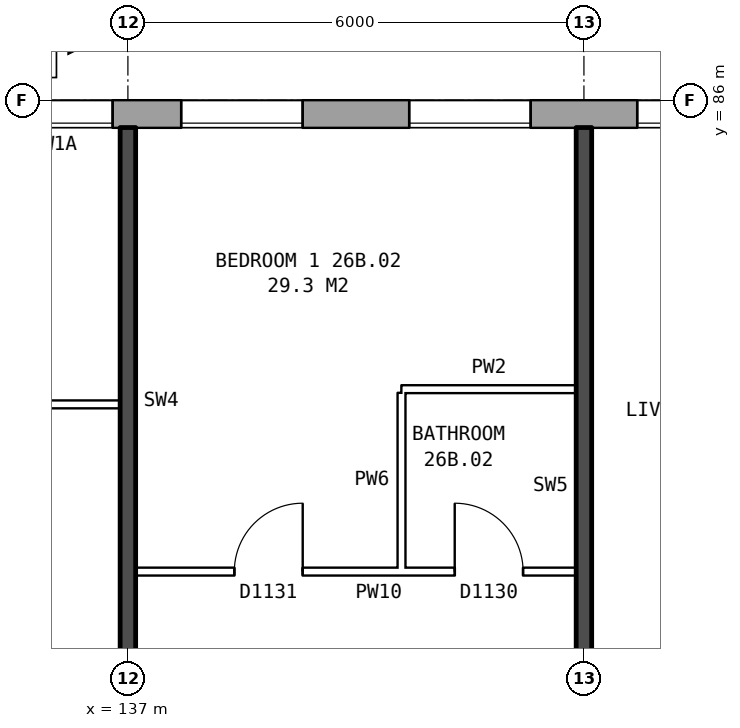
"""IFC4 building model, lengths in metres.
Left out: names, types, materials, properties, quantities, classifications, styles, units other than length and angle.
Written with IfcOpenShell. Run it as: python <this file> out.ifc"""

import sys

from ifc_helpers import new_model, si_unit, direction, frame, frame_2d, origin, place, context, subcontext, project, spatial, rectangle, extrude, element, fill, save


model = new_model("IFC4")
c1 = context("Model", 3, precision=1e-05, world=origin(), true_north=direction((0.0, 1.0)))
c2 = subcontext(c1, "Body", "Model", "MODEL_VIEW")
j1 = project(units=[si_unit("LENGTHUNIT", "METRE"), si_unit("PLANEANGLEUNIT", "RADIAN")], contexts=[c1])
p1 = place(None, origin())
s1 = spatial("IfcSite", under=j1, at=p1, CompositionType="ELEMENT")
p2 = place(p1, origin())
s2 = spatial("IfcBuilding", under=s1, at=p2, CompositionType="ELEMENT")
p3 = place(p2, frame((0.0, 0.0, 96.4)))
s3 = spatial("IfcBuildingStorey", under=s2, at=p3, CompositionType="ELEMENT", Elevation=96.4)
p4 = place(p3, frame((170.925, 85.82, 0.0), z_axis=(0.0, 0.0, 1.0), x_axis=(-1.0, 0.0, 0.0)))
e1 = element("IfcWall", 1, at=p4, inside=s3, PredefinedType="STANDARD", context=c2, shape_type="SweptSolid", body=[
    extrude(rectangle(XDim=36.851, YDim=0.36, at=frame_2d((18.425, 0.0))), origin(), (0.0, 0.0, 1.0), 2.85),
])
p5 = place(p4, frame((1.625, 0.0, 0.8)))
e2 = element("IfcOpeningElement", 2, at=p5, cuts=e1, PredefinedType="OPENING", context=c2, shape_type="SweptSolid", body=[
    extrude(rectangle(XDim=1.6, YDim=1.8, at=frame_2d((0.8, 0.9))), frame((0.0, 0.19, 0.0), z_axis=(0.0, -1.0, 0.0), x_axis=(1.0, 0.0, 0.0)), (0.0, 0.0, 1.0), 0.38),
])
p6 = place(p4, frame((4.625, 0.0, 0.8)))
e3 = element("IfcOpeningElement", 3, at=p6, cuts=e1, PredefinedType="OPENING", context=c2, shape_type="SweptSolid", body=[
    extrude(rectangle(XDim=1.6, YDim=1.8, at=frame_2d((0.8, 0.9))), frame((0.0, 0.19, 0.0), z_axis=(0.0, -1.0, 0.0), x_axis=(1.0, 0.0, 0.0)), (0.0, 0.0, 1.0), 0.38),
])
p7 = place(p4, frame((7.625, 0.0, 0.8)))
e4 = element("IfcOpeningElement", 4, at=p7, cuts=e1, PredefinedType="OPENING", context=c2, shape_type="SweptSolid", body=[
    extrude(rectangle(XDim=1.6, YDim=1.8, at=frame_2d((0.8, 0.9))), frame((0.0, 0.19, 0.0), z_axis=(0.0, -1.0, 0.0), x_axis=(1.0, 0.0, 0.0)), (0.0, 0.0, 1.0), 0.38),
])
p8 = place(p4, frame((10.625, 0.0, 0.8)))
e5 = element("IfcOpeningElement", 5, at=p8, cuts=e1, PredefinedType="OPENING", context=c2, shape_type="SweptSolid", body=[
    extrude(rectangle(XDim=1.6, YDim=1.8, at=frame_2d((0.8, 0.9))), frame((0.0, 0.19, 0.0), z_axis=(0.0, -1.0, 0.0), x_axis=(1.0, 0.0, 0.0)), (0.0, 0.0, 1.0), 0.38),
])
p9 = place(p4, frame((13.625, 0.0, 0.8)))
e6 = element("IfcOpeningElement", 6, at=p9, cuts=e1, PredefinedType="OPENING", context=c2, shape_type="SweptSolid", body=[
    extrude(rectangle(XDim=1.6, YDim=1.8, at=frame_2d((0.8, 0.9))), frame((0.0, 0.19, 0.0), z_axis=(0.0, -1.0, 0.0), x_axis=(1.0, 0.0, 0.0)), (0.0, 0.0, 1.0), 0.38),
])
p10 = place(p4, frame((16.625, 0.0, 0.8)))
e7 = element("IfcOpeningElement", 7, at=p10, cuts=e1, PredefinedType="OPENING", context=c2, shape_type="SweptSolid", body=[
    extrude(rectangle(XDim=1.6, YDim=1.8, at=frame_2d((0.8, 0.9))), frame((0.0, 0.19, 0.0), z_axis=(0.0, -1.0, 0.0), x_axis=(1.0, 0.0, 0.0)), (0.0, 0.0, 1.0), 0.38),
])
p11 = place(p4, frame((19.625, 0.0, 0.8)))
e8 = element("IfcOpeningElement", 8, at=p11, cuts=e1, PredefinedType="OPENING", context=c2, shape_type="SweptSolid", body=[
    extrude(rectangle(XDim=1.6, YDim=1.8, at=frame_2d((0.8, 0.9))), frame((0.0, 0.19, 0.0), z_axis=(0.0, -1.0, 0.0), x_axis=(1.0, 0.0, 0.0)), (0.0, 0.0, 1.0), 0.38),
])
p12 = place(p4, frame((22.625, 0.0, 0.8)))
e9 = element("IfcOpeningElement", 9, at=p12, cuts=e1, PredefinedType="OPENING", context=c2, shape_type="SweptSolid", body=[
    extrude(rectangle(XDim=1.6, YDim=1.8, at=frame_2d((0.8, 0.9))), frame((0.0, 0.19, 0.0), z_axis=(0.0, -1.0, 0.0), x_axis=(1.0, 0.0, 0.0)), (0.0, 0.0, 1.0), 0.38),
])
p13 = place(p4, frame((25.625, 0.0, 0.8)))
e10 = element("IfcOpeningElement", 10, at=p13, cuts=e1, PredefinedType="OPENING", context=c2, shape_type="SweptSolid", body=[
    extrude(rectangle(XDim=1.6, YDim=1.8, at=frame_2d((0.8, 0.9))), frame((0.0, 0.19, 0.0), z_axis=(0.0, -1.0, 0.0), x_axis=(1.0, 0.0, 0.0)), (0.0, 0.0, 1.0), 0.38),
])
p14 = place(p4, frame((28.625, 0.0, 0.8)))
e11 = element("IfcOpeningElement", 11, at=p14, cuts=e1, PredefinedType="OPENING", context=c2, shape_type="SweptSolid", body=[
    extrude(rectangle(XDim=1.6, YDim=1.8, at=frame_2d((0.8, 0.9))), frame((0.0, 0.19, 0.0), z_axis=(0.0, -1.0, 0.0), x_axis=(1.0, 0.0, 0.0)), (0.0, 0.0, 1.0), 0.38),
])
p15 = place(p4, frame((31.625, 0.0, 0.8)))
e12 = element("IfcOpeningElement", 12, at=p15, cuts=e1, PredefinedType="OPENING", context=c2, shape_type="SweptSolid", body=[
    extrude(rectangle(XDim=1.6, YDim=1.8, at=frame_2d((0.8, 0.9))), frame((0.0, 0.19, 0.0), z_axis=(0.0, -1.0, 0.0), x_axis=(1.0, 0.0, 0.0)), (0.0, 0.0, 1.0), 0.38),
])
p16 = place(p4, frame((34.125, 0.0, 0.8)))
e13 = element("IfcOpeningElement", 13, at=p16, cuts=e1, PredefinedType="OPENING", context=c2, shape_type="SweptSolid", body=[
    extrude(rectangle(XDim=1.4, YDim=1.8, at=frame_2d((0.7, 0.9))), frame((0.0, 0.19, 0.0), z_axis=(0.0, -1.0, 0.0), x_axis=(1.0, 0.0, 0.0)), (0.0, 0.0, 1.0), 0.38),
])
p17 = place(p4, frame((35.825, 0.0, 0.8)))
e14 = element("IfcOpeningElement", 14, at=p17, cuts=e1, PredefinedType="OPENING", context=c2, shape_type="SweptSolid", body=[
    extrude(rectangle(XDim=0.6, YDim=1.2, at=frame_2d((0.3, 0.6))), frame((0.0, 0.19, 0.0), z_axis=(0.0, -1.0, 0.0), x_axis=(1.0, 0.0, 0.0)), (0.0, 0.0, 1.0), 0.38),
])
p18 = place(p3, frame((137.1, 79.8, 0.0), z_axis=(0.0, 0.0, 1.0), x_axis=(1.0, 0.0, 0.0)))
e15 = element("IfcWall", 15, at=p18, inside=s3, PredefinedType="PARTITIONING", context=c2, shape_type="SweptSolid", body=[
    extrude(rectangle(XDim=5.8, YDim=0.1, at=frame_2d((2.9, 0.0))), origin(), (0.0, 0.0, 1.0), 2.85),
])
p19 = place(p18, frame((1.3, 0.0, 0.0)))
e16 = element("IfcOpeningElement", 16, at=p19, cuts=e15, PredefinedType="OPENING", context=c2, shape_type="SweptSolid", body=[
    extrude(rectangle(XDim=0.9, YDim=2.1, at=frame_2d((0.45, 1.05))), frame((0.0, 0.06, 0.0), z_axis=(0.0, -1.0, 0.0), x_axis=(1.0, 0.0, 0.0)), (0.0, 0.0, 1.0), 0.12),
])
p20 = place(p18, frame((4.2, 0.0, 0.0)))
e17 = element("IfcOpeningElement", 17, at=p20, cuts=e15, PredefinedType="OPENING", context=c2, shape_type="SweptSolid", body=[
    extrude(rectangle(XDim=0.9, YDim=2.1, at=frame_2d((0.45, 1.05))), frame((0.0, 0.06, 0.0), z_axis=(0.0, -1.0, 0.0), x_axis=(1.0, 0.0, 0.0)), (0.0, 0.0, 1.0), 0.12),
])
p21 = place(p3, frame((131.36, 82.0, 0.0), z_axis=(0.0, 0.0, 1.0), x_axis=(1.0, 0.0, 0.0)))
e18 = element("IfcWall", 18, at=p21, inside=s3, PredefinedType="PARTITIONING", context=c2, shape_type="SweptSolid", body=[
    extrude(rectangle(XDim=5.54, YDim=0.1, at=frame_2d((2.77, 0.0))), origin(), (0.0, 0.0, 1.0), 2.85),
])
p22 = place(p21, frame((2.32, 0.0, 0.0)))
e19 = element("IfcOpeningElement", 19, at=p22, cuts=e18, PredefinedType="OPENING", context=c2, shape_type="SweptSolid", body=[
    extrude(rectangle(XDim=0.9, YDim=2.1, at=frame_2d((0.45, 1.05))), frame((0.0, 0.06, 0.0), z_axis=(0.0, -1.0, 0.0), x_axis=(1.0, 0.0, 0.0)), (0.0, 0.0, 1.0), 0.12),
])
p23 = place(p3, frame((140.6, 82.2, 0.0), z_axis=(0.0, 0.0, 1.0), x_axis=(1.0, 0.0, 0.0)))
e20 = element("IfcWall", 20, at=p23, inside=s3, PredefinedType="PARTITIONING", context=c2, shape_type="SweptSolid", body=[
    extrude(rectangle(XDim=2.3, YDim=0.1, at=frame_2d((1.15, 0.0))), origin(), (0.0, 0.0, 1.0), 2.85),
])
p24 = place(p3, frame((137.0, 76.2, 0.0), z_axis=(0.0, 0.0, 1.0), x_axis=(0.0, 1.0, 0.0)))
e21 = element("IfcWall", 21, at=p24, inside=s3, PredefinedType="SOLIDWALL", context=c2, shape_type="SweptSolid", body=[
    extrude(rectangle(XDim=9.44, YDim=0.2, at=frame_2d((4.72, 0.0))), origin(), (0.0, 0.0, 1.0), 2.85),
])
p25 = place(p24, frame((1.35, 0.0, 0.0)))
e22 = element("IfcOpeningElement", 22, at=p25, cuts=e21, PredefinedType="OPENING", context=c2, shape_type="SweptSolid", body=[
    extrude(rectangle(XDim=0.9, YDim=2.1, at=frame_2d((0.45, 1.05))), frame((0.0, 0.11, 0.0), z_axis=(0.0, -1.0, 0.0), x_axis=(1.0, 0.0, 0.0)), (0.0, 0.0, 1.0), 0.22),
])
p26 = place(p3, frame((140.6, 79.85, 0.0), z_axis=(0.0, 0.0, 1.0), x_axis=(0.0, 1.0, 0.0)))
e23 = element("IfcWall", 23, at=p26, inside=s3, PredefinedType="PARTITIONING", context=c2, shape_type="SweptSolid", body=[
    extrude(rectangle(XDim=2.3, YDim=0.1, at=frame_2d((1.15, 0.0))), origin(), (0.0, 0.0, 1.0), 2.85),
])
p27 = place(p3, frame((143.0, 76.2, 0.0), z_axis=(0.0, 0.0, 1.0), x_axis=(0.0, 1.0, 0.0)))
e24 = element("IfcWall", 24, at=p27, inside=s3, PredefinedType="SOLIDWALL", context=c2, shape_type="SweptSolid", body=[
    extrude(rectangle(XDim=9.44, YDim=0.2, at=frame_2d((4.72, 0.0))), origin(), (0.0, 0.0, 1.0), 2.85),
])
p28 = place(p13, origin())
e25 = element("IfcWindow", 25, at=p28, inside=s3, PartitioningType="SINGLE_PANEL", PredefinedType="WINDOW", context=c2, shape_type="SweptSolid", body=[
    extrude(rectangle(XDim=1.6, YDim=1.8, at=frame_2d((0.8, 0.9))), frame((0.0, 0.15, 0.0), z_axis=(0.0, -1.0, 0.0), x_axis=(1.0, 0.0, 0.0)), (0.0, 0.0, 1.0), 0.06),
])
fill(e10, e25)
p29 = place(p14, origin())
e26 = element("IfcWindow", 26, at=p29, inside=s3, PartitioningType="SINGLE_PANEL", PredefinedType="WINDOW", context=c2, shape_type="SweptSolid", body=[
    extrude(rectangle(XDim=1.6, YDim=1.8, at=frame_2d((0.8, 0.9))), frame((0.0, 0.15, 0.0), z_axis=(0.0, -1.0, 0.0), x_axis=(1.0, 0.0, 0.0)), (0.0, 0.0, 1.0), 0.06),
])
fill(e11, e26)
p30 = place(p15, origin())
e27 = element("IfcWindow", 27, at=p30, inside=s3, PartitioningType="SINGLE_PANEL", PredefinedType="WINDOW", context=c2, shape_type="SweptSolid", body=[
    extrude(rectangle(XDim=1.6, YDim=1.8, at=frame_2d((0.8, 0.9))), frame((0.0, 0.15, 0.0), z_axis=(0.0, -1.0, 0.0), x_axis=(1.0, 0.0, 0.0)), (0.0, 0.0, 1.0), 0.06),
])
fill(e12, e27)
p31 = place(p16, origin())
e28 = element("IfcWindow", 28, at=p31, inside=s3, PartitioningType="SINGLE_PANEL", PredefinedType="WINDOW", context=c2, shape_type="SweptSolid", body=[
    extrude(rectangle(XDim=1.4, YDim=1.8, at=frame_2d((0.7, 0.9))), frame((0.0, 0.15, 0.0), z_axis=(0.0, -1.0, 0.0), x_axis=(1.0, 0.0, 0.0)), (0.0, 0.0, 1.0), 0.06),
])
fill(e13, e28)
p32 = place(p19, origin())
e29 = element("IfcDoor", 29, at=p32, inside=s3, OperationType="SINGLE_SWING_RIGHT", PredefinedType="DOOR", context=c2, shape_type="SweptSolid", body=[
    extrude(rectangle(XDim=0.9, YDim=2.1, at=frame_2d((0.45, 1.05))), frame((0.0, 0.025, 0.0), z_axis=(0.0, -1.0, 0.0), x_axis=(1.0, 0.0, 0.0)), (0.0, 0.0, 1.0), 0.05),
])
fill(e16, e29)
p33 = place(p20, origin())
e30 = element("IfcDoor", 30, at=p33, inside=s3, OperationType="SINGLE_SWING_LEFT", PredefinedType="DOOR", context=c2, shape_type="SweptSolid", body=[
    extrude(rectangle(XDim=0.9, YDim=2.1, at=frame_2d((0.45, 1.05))), frame((0.0, 0.025, 0.0), z_axis=(0.0, -1.0, 0.0), x_axis=(1.0, 0.0, 0.0)), (0.0, 0.0, 1.0), 0.05),
])
fill(e17, e30)
save(model, sys.argv[1])
